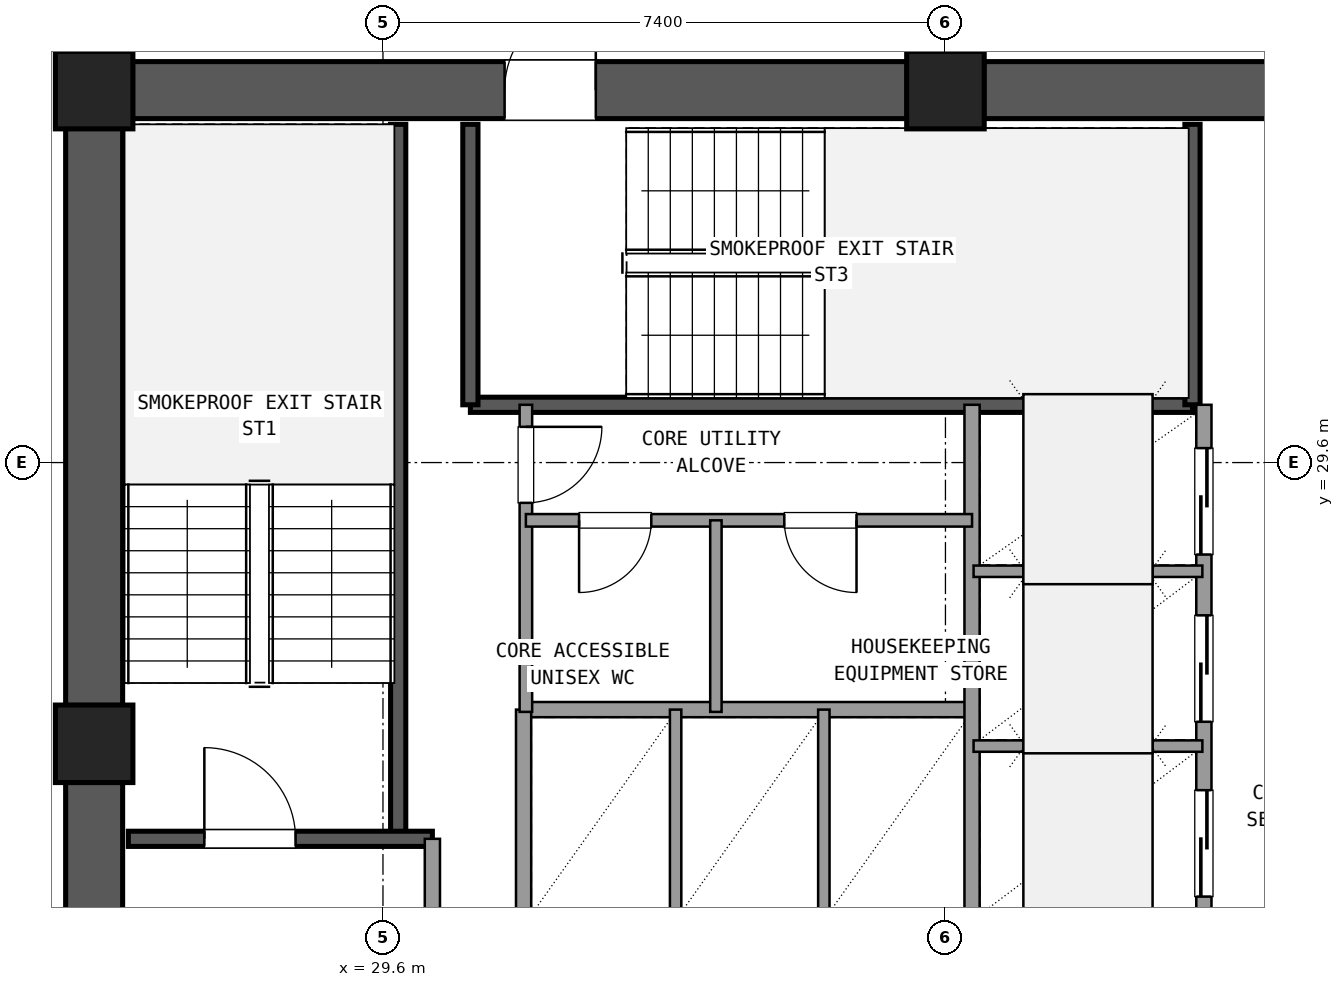
"""IFC4 building model, lengths in metres.
Left out: names, types, materials, properties, quantities, classifications, styles, units other than length and angle.
Written with IfcOpenShell. Run it as: python <this file> out.ifc"""

import sys

from ifc_helpers import new_model, si_unit, direction, frame, frame_2d, origin, origin_2d, place, context, subcontext, project, spatial, rectangle, extrude, element, fill, save


model = new_model("IFC4")
c1 = context("Model", 3, precision=1e-05, world=origin(), true_north=direction((0.0, 1.0)))
c2 = subcontext(c1, "Body", "Model", "MODEL_VIEW")
j1 = project(units=[si_unit("LENGTHUNIT", "METRE"), si_unit("PLANEANGLEUNIT", "RADIAN")], contexts=[c1])
p1 = place(None, origin())
s1 = spatial("IfcSite", under=j1, at=p1, CompositionType="ELEMENT")
p2 = place(p1, origin())
s2 = spatial("IfcBuilding", under=s1, at=p2, CompositionType="ELEMENT")
p3 = place(p2, frame((0.0, 0.0, 160.02)))
s3 = spatial("IfcBuildingStorey", under=s2, at=p3, CompositionType="ELEMENT", Elevation=160.02)
for number, where, z_axis, x_axis in (
    (1, (37.0, 34.5, 0.0), (0.0, 0.0, 1.0), (1.0, 0.0, 0.0)),
    (2, (25.8, 34.5, 0.0), (0.0, 0.0, 1.0), (1.0, 0.0, 0.0)),
    (3, (25.8, 25.9, 0.0), (0.0, 0.0, 1.0), (1.0, 0.0, 0.0)),
):
    element("IfcColumn", number, at=place(p3, frame(where, z_axis=z_axis, x_axis=x_axis)), inside=s3, PredefinedType="COLUMN", context=c2, shape_type="SweptSolid", body=[
        extrude(rectangle(XDim=1.02, YDim=1.02, at=origin_2d()), origin(), (0.0, 0.0, 1.0), 3.6),
    ])
p4 = place(p3, frame((47.695, 34.5, 0.0), z_axis=(0.0, 0.0, 1.0), x_axis=(-1.0, 0.0, 0.0)))
e4 = element("IfcWall", 4, at=p4, inside=s3, PredefinedType="SHEAR", context=c2, shape_type="SweptSolid", body=[
    extrude(rectangle(XDim=10.19, YDim=0.75, at=frame_2d((5.095, 0.0))), origin(), (0.0, 0.0, 1.0), 3.32),
])
p5 = place(p4, frame((4.595, 0.0, 0.0)))
e5 = element("IfcOpeningElement", 5, at=p5, cuts=e4, PredefinedType="OPENING", context=c2, shape_type="SweptSolid", body=[
    extrude(rectangle(XDim=1.6, YDim=2.2, at=frame_2d((0.8, 1.1))), frame((0.0, 0.385, 0.0), z_axis=(0.0, -1.0, 0.0), x_axis=(1.0, 0.0, 0.0)), (0.0, 0.0, 1.0), 0.77),
])
p6 = place(p3, frame((36.495, 34.5, 0.0), z_axis=(0.0, 0.0, 1.0), x_axis=(-1.0, 0.0, 0.0)))
e6 = element("IfcWall", 6, at=p6, inside=s3, PredefinedType="SHEAR", context=c2, shape_type="SweptSolid", body=[
    extrude(rectangle(XDim=10.19, YDim=0.75, at=frame_2d((5.095, 0.0))), origin(), (0.0, 0.0, 1.0), 3.32),
])
p7 = place(p6, frame((4.095, 0.0, 0.0)))
e7 = element("IfcOpeningElement", 7, at=p7, cuts=e6, PredefinedType="OPENING", context=c2, shape_type="SweptSolid", body=[
    extrude(rectangle(XDim=1.2, YDim=2.15, at=frame_2d((0.6, 1.075))), frame((0.0, 0.385, 0.0), z_axis=(0.0, -1.0, 0.0), x_axis=(1.0, 0.0, 0.0)), (0.0, 0.0, 1.0), 0.77),
])
p8 = place(p3, frame((25.8, 33.995, 0.0), z_axis=(0.0, 0.0, 1.0), x_axis=(0.0, -1.0, 0.0)))
e8 = element("IfcWall", 8, at=p8, inside=s3, PredefinedType="SHEAR", context=c2, shape_type="SweptSolid", body=[
    extrude(rectangle(XDim=7.59, YDim=0.75, at=frame_2d((3.795, 0.0))), origin(), (0.0, 0.0, 1.0), 3.32),
])
p9 = place(p3, frame((25.8, 25.395, 0.0), z_axis=(0.0, 0.0, 1.0), x_axis=(0.0, -1.0, 0.0)))
e9 = element("IfcWall", 9, at=p9, inside=s3, PredefinedType="SHEAR", context=c2, shape_type="SweptSolid", body=[
    extrude(rectangle(XDim=7.59, YDim=0.75, at=frame_2d((3.795, 0.0))), origin(), (0.0, 0.0, 1.0), 3.32),
])
p10 = place(p9, frame((2.145, 0.0, 0.0)))
e10 = element("IfcOpeningElement", 10, at=p10, cuts=e9, PredefinedType="OPENING", context=c2, shape_type="SweptSolid", body=[
    extrude(rectangle(XDim=1.2, YDim=2.15, at=frame_2d((0.6, 1.075))), frame((0.0, 0.385, 0.0), z_axis=(0.0, -1.0, 0.0), x_axis=(1.0, 0.0, 0.0)), (0.0, 0.0, 1.0), 0.77),
])
p11 = place(p3, frame((29.8, 24.65, 0.0), z_axis=(0.0, 0.0, 1.0), x_axis=(0.0, 1.0, 0.0)))
e11 = element("IfcWall", 11, at=p11, inside=s3, PredefinedType="SHEAR", context=c2, shape_type="SweptSolid", body=[
    extrude(rectangle(XDim=9.4, YDim=0.2, at=frame_2d((4.7, 0.0))), origin(), (0.0, 0.0, 1.0), 3.32),
])
p12 = place(p3, frame((26.25, 24.65, 0.0), z_axis=(0.0, 0.0, 1.0), x_axis=(1.0, 0.0, 0.0)))
e12 = element("IfcWall", 12, at=p12, inside=s3, PredefinedType="SHEAR", context=c2, shape_type="SweptSolid", body=[
    extrude(rectangle(XDim=4.0, YDim=0.2, at=frame_2d((2.0, 0.0))), origin(), (0.0, 0.0, 1.0), 3.32),
])
p13 = place(p12, frame((1.0, 0.0, 0.0)))
e13 = element("IfcOpeningElement", 13, at=p13, cuts=e12, PredefinedType="OPENING", context=c2, shape_type="SweptSolid", body=[
    extrude(rectangle(XDim=1.2, YDim=2.15, at=frame_2d((0.6, 1.075))), frame((0.0, 0.11, 0.0), z_axis=(0.0, -1.0, 0.0), x_axis=(1.0, 0.0, 0.0)), (0.0, 0.0, 1.0), 0.22),
])
p14 = place(p3, frame((30.75, 30.36, 0.0), z_axis=(0.0, 0.0, 1.0), x_axis=(1.0, 0.0, 0.0)))
e14 = element("IfcWall", 14, at=p14, inside=s3, PredefinedType="SHEAR", context=c2, shape_type="SweptSolid", body=[
    extrude(rectangle(XDim=9.5, YDim=0.2, at=frame_2d((4.75, 0.0))), origin(), (0.0, 0.0, 1.0), 3.32),
])
for number, where, z_axis, x_axis in (
    (15, (30.75, 30.36, 0.0), (0.0, 0.0, 1.0), (0.0, 1.0, 0.0)),
    (16, (40.25, 30.36, 0.0), (0.0, 0.0, 1.0), (0.0, 1.0, 0.0)),
):
    element("IfcWall", number, at=place(p3, frame(where, z_axis=z_axis, x_axis=x_axis)), inside=s3, PredefinedType="SHEAR", context=c2, shape_type="SweptSolid", body=[
        extrude(rectangle(XDim=3.69, YDim=0.2, at=frame_2d((1.845, 0.0))), origin(), (0.0, 0.0, 1.0), 3.32),
    ])
p15 = place(p3, frame((30.25, 17.75, 0.0), z_axis=(0.0, 0.0, 1.0), x_axis=(0.0, 1.0, 0.0)))
e17 = element("IfcWall", 17, at=p15, inside=s3, PredefinedType="SOLIDWALL", context=c2, shape_type="SweptSolid", body=[
    extrude(rectangle(XDim=6.9, YDim=0.2, at=frame_2d((3.45, 0.0))), origin(), (0.0, 0.0, 1.0), 2.61),
])
p16 = place(p15, frame((4.15, 0.0, 0.0)))
e18 = element("IfcOpeningElement", 18, at=p16, cuts=e17, PredefinedType="OPENING", context=c2, shape_type="SweptSolid", body=[
    extrude(rectangle(XDim=1.2, YDim=2.15, at=frame_2d((0.6, 1.075))), frame((0.0, 0.11, 0.0), z_axis=(0.0, -1.0, 0.0), x_axis=(1.0, 0.0, 0.0)), (0.0, 0.0, 1.0), 0.22),
])
p17 = place(p3, frame((31.45, 26.35, 0.0), z_axis=(0.0, 0.0, 1.0), x_axis=(1.0, 0.0, 0.0)))
e19 = element("IfcWall", 19, at=p17, inside=s3, PredefinedType="SOLIDWALL", context=c2, shape_type="SweptSolid", body=[
    extrude(rectangle(XDim=5.9, YDim=0.2, at=frame_2d((2.95, 0.0))), origin(), (0.0, 0.0, 1.0), 2.61),
])
p18 = place(p3, frame((31.45, 23.54, 0.0), z_axis=(0.0, 0.0, 1.0), x_axis=(0.0, 1.0, 0.0)))
e20 = element("IfcWall", 20, at=p18, inside=s3, PredefinedType="SOLIDWALL", context=c2, shape_type="SweptSolid", body=[
    extrude(rectangle(XDim=2.81, YDim=0.2, at=frame_2d((1.405, 0.0))), origin(), (0.0, 0.0, 1.0), 2.61),
])
for number, where, z_axis, x_axis in (
    (21, (33.45, 23.54, 0.0), (0.0, 0.0, 1.0), (0.0, 1.0, 0.0)),
    (22, (35.4, 23.54, 0.0), (0.0, 0.0, 1.0), (0.0, 1.0, 0.0)),
):
    element("IfcWall", number, at=place(p3, frame(where, z_axis=z_axis, x_axis=x_axis)), inside=s3, PredefinedType="PARTITIONING", context=c2, shape_type="SweptSolid", body=[
        extrude(rectangle(XDim=2.81, YDim=0.15, at=frame_2d((1.405, 0.0))), origin(), (0.0, 0.0, 1.0), 2.61),
    ])
p19 = place(p3, frame((37.35, 23.54, 0.0), z_axis=(0.0, 0.0, 1.0), x_axis=(0.0, 1.0, 0.0)))
e23 = element("IfcWall", 23, at=p19, inside=s3, PredefinedType="SOLIDWALL", context=c2, shape_type="SweptSolid", body=[
    extrude(rectangle(XDim=6.82, YDim=0.2, at=frame_2d((3.41, 0.0))), origin(), (0.0, 0.0, 1.0), 2.61),
])
p20 = place(p3, frame((40.4, 23.54, 0.0), z_axis=(0.0, 0.0, 1.0), x_axis=(0.0, 1.0, 0.0)))
e24 = element("IfcWall", 24, at=p20, inside=s3, PredefinedType="SOLIDWALL", context=c2, shape_type="SweptSolid", body=[
    extrude(rectangle(XDim=6.82, YDim=0.2, at=frame_2d((3.41, 0.0))), origin(), (0.0, 0.0, 1.0), 2.61),
])
p21 = place(p20, frame((0.35, 0.0, 0.0)))
e25 = element("IfcOpeningElement", 25, at=p21, cuts=e24, PredefinedType="OPENING", context=c2, shape_type="SweptSolid", body=[
    extrude(rectangle(XDim=1.4, YDim=2.2, at=frame_2d((0.7, 1.1))), frame((0.0, 0.11, 0.0), z_axis=(0.0, -1.0, 0.0), x_axis=(1.0, 0.0, 0.0)), (0.0, 0.0, 1.0), 0.22),
])
p22 = place(p20, frame((2.65, 0.0, 0.0)))
e26 = element("IfcOpeningElement", 26, at=p22, cuts=e24, PredefinedType="OPENING", context=c2, shape_type="SweptSolid", body=[
    extrude(rectangle(XDim=1.4, YDim=2.2, at=frame_2d((0.7, 1.1))), frame((0.0, 0.11, 0.0), z_axis=(0.0, -1.0, 0.0), x_axis=(1.0, 0.0, 0.0)), (0.0, 0.0, 1.0), 0.22),
])
p23 = place(p20, frame((4.85, 0.0, 0.0)))
e27 = element("IfcOpeningElement", 27, at=p23, cuts=e24, PredefinedType="OPENING", context=c2, shape_type="SweptSolid", body=[
    extrude(rectangle(XDim=1.4, YDim=2.2, at=frame_2d((0.7, 1.1))), frame((0.0, 0.11, 0.0), z_axis=(0.0, -1.0, 0.0), x_axis=(1.0, 0.0, 0.0)), (0.0, 0.0, 1.0), 0.22),
])
for number, where, z_axis, x_axis in (
    (28, (37.37, 25.87, 0.0), (0.0, 0.0, 1.0), (1.0, 0.0, 0.0)),
    (29, (37.37, 28.17, 0.0), (0.0, 0.0, 1.0), (1.0, 0.0, 0.0)),
):
    element("IfcWall", number, at=place(p3, frame(where, z_axis=z_axis, x_axis=x_axis)), inside=s3, PredefinedType="PARTITIONING", context=c2, shape_type="SweptSolid", body=[
        extrude(rectangle(XDim=3.01, YDim=0.15, at=frame_2d((1.505, 0.0))), origin(), (0.0, 0.0, 1.0), 2.61),
    ])
p24 = place(p3, frame((31.48, 26.32, 0.0), z_axis=(0.0, 0.0, 1.0), x_axis=(0.0, 1.0, 0.0)))
e30 = element("IfcWall", 30, at=p24, inside=s3, PredefinedType="PLUMBINGWALL", context=c2, shape_type="SweptSolid", body=[
    extrude(rectangle(XDim=4.04, YDim=0.165, at=frame_2d((2.02, 0.0))), origin(), (0.0, 0.0, 1.0), 2.61),
])
p25 = place(p24, frame((2.75, 0.0, 0.0)))
e31 = element("IfcOpeningElement", 31, at=p25, cuts=e30, PredefinedType="OPENING", context=c2, shape_type="SweptSolid", body=[
    extrude(rectangle(XDim=1.0, YDim=2.15, at=frame_2d((0.5, 1.075))), frame((0.0, 0.093, 0.0), z_axis=(0.0, -1.0, 0.0), x_axis=(1.0, 0.0, 0.0)), (0.0, 0.0, 1.0), 0.185),
])
p26 = place(p3, frame((31.48, 28.84, 0.0), z_axis=(0.0, 0.0, 1.0), x_axis=(1.0, 0.0, 0.0)))
e32 = element("IfcWall", 32, at=p26, inside=s3, PredefinedType="PLUMBINGWALL", context=c2, shape_type="SweptSolid", body=[
    extrude(rectangle(XDim=5.87, YDim=0.165, at=frame_2d((2.935, 0.0))), origin(), (0.0, 0.0, 1.0), 2.61),
])
p27 = place(p26, frame((0.7, 0.0, 0.0)))
e33 = element("IfcOpeningElement", 33, at=p27, cuts=e32, PredefinedType="OPENING", context=c2, shape_type="SweptSolid", body=[
    extrude(rectangle(XDim=0.95, YDim=2.1, at=frame_2d((0.475, 1.05))), frame((0.0, 0.093, 0.0), z_axis=(0.0, -1.0, 0.0), x_axis=(1.0, 0.0, 0.0)), (0.0, 0.0, 1.0), 0.185),
])
p28 = place(p26, frame((3.4, 0.0, 0.0)))
e34 = element("IfcOpeningElement", 34, at=p28, cuts=e32, PredefinedType="OPENING", context=c2, shape_type="SweptSolid", body=[
    extrude(rectangle(XDim=0.95, YDim=2.1, at=frame_2d((0.475, 1.05))), frame((0.0, 0.093, 0.0), z_axis=(0.0, -1.0, 0.0), x_axis=(1.0, 0.0, 0.0)), (0.0, 0.0, 1.0), 0.185),
])
p29 = place(p3, frame((33.98, 26.32, 0.0), z_axis=(0.0, 0.0, 1.0), x_axis=(0.0, 1.0, 0.0)))
e35 = element("IfcWall", 35, at=p29, inside=s3, PredefinedType="PARTITIONING", context=c2, shape_type="SweptSolid", body=[
    extrude(rectangle(XDim=2.52, YDim=0.15, at=frame_2d((1.26, 0.0))), origin(), (0.0, 0.0, 1.0), 2.61),
])
p30 = place(p3, frame((37.0, 34.95, 0.0), z_axis=(0.0, 0.0, 1.0), x_axis=(0.0, 1.0, 0.0)))
e36 = element("IfcWall", 36, at=p30, inside=s3, PredefinedType="PARTITIONING", context=c2, shape_type="SweptSolid", body=[
    extrude(rectangle(XDim=3.21, YDim=0.18, at=frame_2d((1.605, 0.0))), origin(), (0.0, 0.0, 1.0), 2.61),
])
p31 = place(p30, frame((0.605, 0.0, 0.0)))
e37 = element("IfcOpeningElement", 37, at=p31, cuts=e36, PredefinedType="OPENING", context=c2, shape_type="SweptSolid", body=[
    extrude(rectangle(XDim=2.0, YDim=2.2, at=frame_2d((1.0, 1.1))), frame((0.0, 0.1, 0.0), z_axis=(0.0, -1.0, 0.0), x_axis=(1.0, 0.0, 0.0)), (0.0, 0.0, 1.0), 0.2),
])
p32 = place(p13, origin())
e38 = element("IfcDoor", 38, at=p32, inside=s3, OperationType="SINGLE_SWING_LEFT", PredefinedType="DOOR", context=c2, shape_type="SweptSolid", body=[
    extrude(rectangle(XDim=1.2, YDim=2.15, at=frame_2d((0.6, 1.075))), frame((0.0, 0.025, 0.0), z_axis=(0.0, -1.0, 0.0), x_axis=(1.0, 0.0, 0.0)), (0.0, 0.0, 1.0), 0.05),
])
fill(e13, e38)
p33 = place(p7, frame((1.2, 0.0, 0.0), z_axis=(0.0, 0.0, 1.0), x_axis=(-1.0, 0.0, 0.0)))
e39 = element("IfcDoor", 39, at=p33, inside=s3, OperationType="SINGLE_SWING_LEFT", PredefinedType="DOOR", context=c2, shape_type="SweptSolid", body=[
    extrude(rectangle(XDim=1.2, YDim=2.15, at=frame_2d((0.6, 1.075))), frame((0.0, 0.025, 0.0), z_axis=(0.0, -1.0, 0.0), x_axis=(1.0, 0.0, 0.0)), (0.0, 0.0, 1.0), 0.05),
])
fill(e7, e39)
p34 = place(p21, origin())
e40 = element("IfcDoor", 40, at=p34, inside=s3, OperationType="SLIDING_TO_LEFT", PredefinedType="DOOR", context=c2, shape_type="SweptSolid", body=[
    extrude(rectangle(XDim=1.4, YDim=2.2, at=frame_2d((0.7, 1.1))), frame((0.0, 0.025, 0.0), z_axis=(0.0, -1.0, 0.0), x_axis=(1.0, 0.0, 0.0)), (0.0, 0.0, 1.0), 0.05),
])
fill(e25, e40)
p35 = place(p22, origin())
e41 = element("IfcDoor", 41, at=p35, inside=s3, OperationType="SLIDING_TO_LEFT", PredefinedType="DOOR", context=c2, shape_type="SweptSolid", body=[
    extrude(rectangle(XDim=1.4, YDim=2.2, at=frame_2d((0.7, 1.1))), frame((0.0, 0.025, 0.0), z_axis=(0.0, -1.0, 0.0), x_axis=(1.0, 0.0, 0.0)), (0.0, 0.0, 1.0), 0.05),
])
fill(e26, e41)
p36 = place(p23, origin())
e42 = element("IfcDoor", 42, at=p36, inside=s3, OperationType="SLIDING_TO_RIGHT", PredefinedType="DOOR", context=c2, shape_type="SweptSolid", body=[
    extrude(rectangle(XDim=1.4, YDim=2.2, at=frame_2d((0.7, 1.1))), frame((0.0, 0.025, 0.0), z_axis=(0.0, -1.0, 0.0), x_axis=(1.0, 0.0, 0.0)), (0.0, 0.0, 1.0), 0.05),
])
fill(e27, e42)
p37 = place(p25, frame((1.0, 0.0, 0.0), z_axis=(0.0, 0.0, 1.0), x_axis=(-1.0, 0.0, 0.0)))
e43 = element("IfcDoor", 43, at=p37, inside=s3, OperationType="SINGLE_SWING_RIGHT", PredefinedType="DOOR", context=c2, shape_type="SweptSolid", body=[
    extrude(rectangle(XDim=1.0, YDim=2.15, at=frame_2d((0.5, 1.075))), frame((0.0, 0.025, 0.0), z_axis=(0.0, -1.0, 0.0), x_axis=(1.0, 0.0, 0.0)), (0.0, 0.0, 1.0), 0.05),
])
fill(e31, e43)
p38 = place(p27, frame((0.95, 0.0, 0.0), z_axis=(0.0, 0.0, 1.0), x_axis=(-1.0, 0.0, 0.0)))
e44 = element("IfcDoor", 44, at=p38, inside=s3, OperationType="SINGLE_SWING_LEFT", PredefinedType="DOOR", context=c2, shape_type="SweptSolid", body=[
    extrude(rectangle(XDim=0.95, YDim=2.1, at=frame_2d((0.475, 1.05))), frame((0.0, 0.025, 0.0), z_axis=(0.0, -1.0, 0.0), x_axis=(1.0, 0.0, 0.0)), (0.0, 0.0, 1.0), 0.05),
])
fill(e33, e44)
p39 = place(p28, frame((0.95, 0.0, 0.0), z_axis=(0.0, 0.0, 1.0), x_axis=(-1.0, 0.0, 0.0)))
e45 = element("IfcDoor", 45, at=p39, inside=s3, OperationType="SINGLE_SWING_RIGHT", PredefinedType="DOOR", context=c2, shape_type="SweptSolid", body=[
    extrude(rectangle(XDim=0.95, YDim=2.1, at=frame_2d((0.475, 1.05))), frame((0.0, 0.025, 0.0), z_axis=(0.0, -1.0, 0.0), x_axis=(1.0, 0.0, 0.0)), (0.0, 0.0, 1.0), 0.05),
])
fill(e34, e45)
save(model, sys.argv[1])
